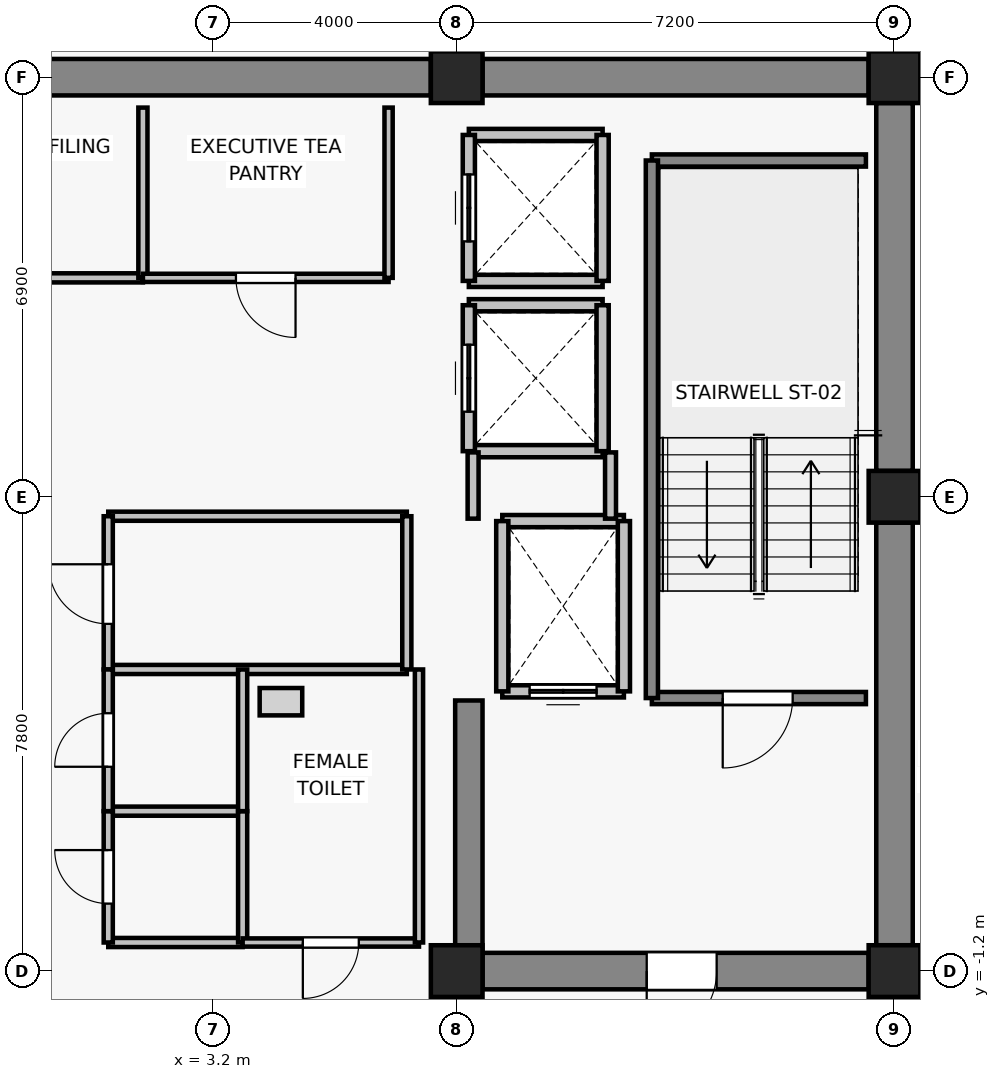
"""IFC4 building model, lengths in metres.
Left out: names, types, materials, properties, quantities, classifications, styles, units other than length and angle.
Written with IfcOpenShell. Run it as: python <this file> out.ifc"""

import sys

from ifc_helpers import new_model, si_unit, direction, frame, frame_2d, origin, origin_2d, place, context, subcontext, project, spatial, rectangle, extrude, source, transform, mapped, element, fill, save


model = new_model("IFC4")
c1 = context("Model", 3, precision=1e-05, world=origin(), true_north=direction((0.0, 1.0)))
c2 = subcontext(c1, "Body", "Model", "MODEL_VIEW")
j1 = project(units=[si_unit("LENGTHUNIT", "METRE"), si_unit("PLANEANGLEUNIT", "RADIAN")], contexts=[c1])
p1 = place(None, origin())
s1 = spatial("IfcSite", under=j1, at=p1, CompositionType="ELEMENT")
p2 = place(p1, origin())
s2 = spatial("IfcBuilding", under=s1, at=p2, CompositionType="ELEMENT")
p3 = place(p2, frame((0.0, 0.0, 225.4)))
s3 = spatial("IfcBuildingStorey", under=s2, at=p3, CompositionType="ELEMENT", Elevation=225.4)
for number, where, z_axis, x_axis in (
    (1, (7.2, -1.2, 0.0), (0.0, 0.0, 1.0), (1.0, 0.0, 0.0)),
    (2, (14.4, -1.2, 0.0), (0.0, 0.0, 1.0), (1.0, 0.0, 0.0)),
    (3, (14.4, 6.6, 0.0), (0.0, 0.0, 1.0), (1.0, 0.0, 0.0)),
    (4, (7.2, 13.5, 0.0), (0.0, 0.0, 1.0), (1.0, 0.0, 0.0)),
    (5, (14.4, 13.5, 0.0), (0.0, 0.0, 1.0), (1.0, 0.0, 0.0)),
):
    element("IfcColumn", number, at=place(p3, frame(where, z_axis=z_axis, x_axis=x_axis)), inside=s3, PredefinedType="COLUMN", context=c2, shape_type="SweptSolid", body=[
        extrude(rectangle(XDim=0.85, YDim=0.85, at=origin_2d()), origin(), (0.0, 0.0, 1.0), 3.3),
    ])
p4 = place(p3, frame((-6.775, 13.5, 0.0), z_axis=(0.0, 0.0, 1.0), x_axis=(1.0, 0.0, 0.0)))
e6 = element("IfcWall", 6, at=p4, inside=s3, PredefinedType="SHEAR", context=c2, shape_type="SweptSolid", body=[
    extrude(rectangle(XDim=13.55, YDim=0.6, at=frame_2d((6.775, 0.0))), origin(), (0.0, 0.0, 1.0), 3.075),
])
p5 = place(p3, frame((7.625, 13.5, 0.0), z_axis=(0.0, 0.0, 1.0), x_axis=(1.0, 0.0, 0.0)))
e7 = element("IfcWall", 7, at=p5, inside=s3, PredefinedType="SHEAR", context=c2, shape_type="SweptSolid", body=[
    extrude(rectangle(XDim=6.35, YDim=0.6, at=frame_2d((3.175, 0.0))), origin(), (0.0, 0.0, 1.0), 3.075),
])
p6 = place(p3, frame((14.4, -0.775, 0.0), z_axis=(0.0, 0.0, 1.0), x_axis=(0.0, 1.0, 0.0)))
e8 = element("IfcWall", 8, at=p6, inside=s3, PredefinedType="SHEAR", context=c2, shape_type="SweptSolid", body=[
    extrude(rectangle(XDim=6.95, YDim=0.6, at=frame_2d((3.475, 0.0))), origin(), (0.0, 0.0, 1.0), 3.075),
])
p7 = place(p3, frame((14.4, 7.025, 0.0), z_axis=(0.0, 0.0, 1.0), x_axis=(0.0, 1.0, 0.0)))
e9 = element("IfcWall", 9, at=p7, inside=s3, PredefinedType="SHEAR", context=c2, shape_type="SweptSolid", body=[
    extrude(rectangle(XDim=6.05, YDim=0.6, at=frame_2d((3.025, 0.0))), origin(), (0.0, 0.0, 1.0), 3.075),
])
p8 = place(p3, frame((13.975, -1.2, 0.0), z_axis=(0.0, 0.0, 1.0), x_axis=(-1.0, 0.0, 0.0)))
e10 = element("IfcWall", 10, at=p8, inside=s3, PredefinedType="SHEAR", context=c2, shape_type="SweptSolid", body=[
    extrude(rectangle(XDim=6.35, YDim=0.6, at=frame_2d((3.175, 0.0))), origin(), (0.0, 0.0, 1.0), 3.075),
])
p9 = place(p8, frame((2.5, 0.0, 0.0)))
e11 = element("IfcOpeningElement", 11, at=p9, cuts=e10, PredefinedType="OPENING", context=c2, shape_type="SweptSolid", body=[
    extrude(rectangle(XDim=1.15, YDim=2.15, at=frame_2d((0.575, 1.075))), frame((0.0, 0.31, 0.0), z_axis=(0.0, -1.0, 0.0), x_axis=(1.0, 0.0, 0.0)), (0.0, 0.0, 1.0), 0.62),
])
p10 = place(p3, frame((7.4, -0.9, 0.0), z_axis=(0.0, 0.0, 1.0), x_axis=(0.0, 1.0, 0.0)))
e12 = element("IfcWall", 12, at=p10, inside=s3, PredefinedType="SHEAR", context=c2, shape_type="SweptSolid", body=[
    extrude(rectangle(XDim=4.15, YDim=0.45, at=frame_2d((2.075, 0.0))), origin(), (0.0, 0.0, 1.0), 3.075),
])
p11 = place(p3, frame((9.95, 3.4, 0.0), z_axis=(0.0, 0.0, 1.0), x_axis=(-1.0, 0.0, 0.0)))
e13 = element("IfcWall", 13, at=p11, inside=s3, PredefinedType="SOLIDWALL", context=c2, shape_type="SweptSolid", body=[
    extrude(rectangle(XDim=2.0, YDim=0.2, at=frame_2d((1.0, 0.0))), origin(), (0.0, 0.0, 1.0), 3.075),
])
p12 = place(p11, frame((0.45, 0.0, 0.0)))
e14 = element("IfcOpeningElement", 14, at=p12, cuts=e13, PredefinedType="OPENING", context=c2, shape_type="SweptSolid", body=[
    extrude(rectangle(XDim=1.1, YDim=2.2, at=frame_2d((0.55, 1.1))), frame((0.0, 0.11, 0.0), z_axis=(0.0, -1.0, 0.0), x_axis=(1.0, 0.0, 0.0)), (0.0, 0.0, 1.0), 0.22),
])
p13 = place(p3, frame((7.95, 6.2, 0.0), z_axis=(0.0, 0.0, 1.0), x_axis=(1.0, 0.0, 0.0)))
e15 = element("IfcWall", 15, at=p13, inside=s3, PredefinedType="SOLIDWALL", context=c2, shape_type="SweptSolid", body=[
    extrude(rectangle(XDim=2.0, YDim=0.2, at=frame_2d((1.0, 0.0))), origin(), (0.0, 0.0, 1.0), 3.075),
])
for number, where, z_axis, x_axis in (
    (16, (7.95, 3.4, 0.0), (0.0, 0.0, 1.0), (0.0, 1.0, 0.0)),
    (17, (9.95, 6.2, 0.0), (0.0, 0.0, 1.0), (0.0, -1.0, 0.0)),
):
    element("IfcWall", number, at=place(p3, frame(where, z_axis=z_axis, x_axis=x_axis)), inside=s3, PredefinedType="SOLIDWALL", context=c2, shape_type="SweptSolid", body=[
        extrude(rectangle(XDim=2.8, YDim=0.2, at=frame_2d((1.4, 0.0))), origin(), (0.0, 0.0, 1.0), 3.075),
    ])
for number, where, z_axis, x_axis in (
    (18, (9.6, 7.35, 0.0), (0.0, 0.0, 1.0), (-1.0, 0.0, 0.0)),
    (19, (7.4, 9.75, 0.0), (0.0, 0.0, 1.0), (1.0, 0.0, 0.0)),
):
    element("IfcWall", number, at=place(p3, frame(where, z_axis=z_axis, x_axis=x_axis)), inside=s3, PredefinedType="SOLIDWALL", context=c2, shape_type="SweptSolid", body=[
        extrude(rectangle(XDim=2.2, YDim=0.2, at=frame_2d((1.1, 0.0))), origin(), (0.0, 0.0, 1.0), 2.615),
    ])
p14 = place(p3, frame((7.4, 7.35, 0.0), z_axis=(0.0, 0.0, 1.0), x_axis=(0.0, 1.0, 0.0)))
e20 = element("IfcWall", 20, at=p14, inside=s3, PredefinedType="SOLIDWALL", context=c2, shape_type="SweptSolid", body=[
    extrude(rectangle(XDim=2.4, YDim=0.2, at=frame_2d((1.2, 0.0))), origin(), (0.0, 0.0, 1.0), 2.615),
])
p15 = place(p14, frame((0.65, 0.0, 0.0)))
e21 = element("IfcOpeningElement", 21, at=p15, cuts=e20, PredefinedType="OPENING", context=c2, shape_type="SweptSolid", body=[
    extrude(rectangle(XDim=1.1, YDim=2.2, at=frame_2d((0.55, 1.1))), frame((0.0, 0.11, 0.0), z_axis=(0.0, -1.0, 0.0), x_axis=(1.0, 0.0, 0.0)), (0.0, 0.0, 1.0), 0.22),
])
p16 = place(p3, frame((9.6, 9.75, 0.0), z_axis=(0.0, 0.0, 1.0), x_axis=(0.0, -1.0, 0.0)))
e22 = element("IfcWall", 22, at=p16, inside=s3, PredefinedType="SOLIDWALL", context=c2, shape_type="SweptSolid", body=[
    extrude(rectangle(XDim=2.4, YDim=0.2, at=frame_2d((1.2, 0.0))), origin(), (0.0, 0.0, 1.0), 3.075),
])
for number, where, z_axis, x_axis in (
    (23, (9.6, 10.15, 0.0), (0.0, 0.0, 1.0), (-1.0, 0.0, 0.0)),
    (24, (7.4, 12.55, 0.0), (0.0, 0.0, 1.0), (1.0, 0.0, 0.0)),
):
    element("IfcWall", number, at=place(p3, frame(where, z_axis=z_axis, x_axis=x_axis)), inside=s3, PredefinedType="SOLIDWALL", context=c2, shape_type="SweptSolid", body=[
        extrude(rectangle(XDim=2.2, YDim=0.2, at=frame_2d((1.1, 0.0))), origin(), (0.0, 0.0, 1.0), 2.615),
    ])
p17 = place(p3, frame((7.4, 10.15, 0.0), z_axis=(0.0, 0.0, 1.0), x_axis=(0.0, 1.0, 0.0)))
e25 = element("IfcWall", 25, at=p17, inside=s3, PredefinedType="SOLIDWALL", context=c2, shape_type="SweptSolid", body=[
    extrude(rectangle(XDim=2.4, YDim=0.2, at=frame_2d((1.2, 0.0))), origin(), (0.0, 0.0, 1.0), 2.615),
])
p18 = place(p17, frame((0.65, 0.0, 0.0)))
e26 = element("IfcOpeningElement", 26, at=p18, cuts=e25, PredefinedType="OPENING", context=c2, shape_type="SweptSolid", body=[
    extrude(rectangle(XDim=1.1, YDim=2.2, at=frame_2d((0.55, 1.1))), frame((0.0, 0.11, 0.0), z_axis=(0.0, -1.0, 0.0), x_axis=(1.0, 0.0, 0.0)), (0.0, 0.0, 1.0), 0.22),
])
p19 = place(p3, frame((9.6, 12.55, 0.0), z_axis=(0.0, 0.0, 1.0), x_axis=(0.0, -1.0, 0.0)))
e27 = element("IfcWall", 27, at=p19, inside=s3, PredefinedType="SOLIDWALL", context=c2, shape_type="SweptSolid", body=[
    extrude(rectangle(XDim=2.4, YDim=0.2, at=frame_2d((1.2, 0.0))), origin(), (0.0, 0.0, 1.0), 3.075),
])
p20 = place(p3, frame((13.93, 3.29, 0.0), z_axis=(0.0, 0.0, 1.0), x_axis=(-1.0, 0.0, 0.0)))
e28 = element("IfcWall", 28, at=p20, inside=s3, PredefinedType="SOLIDWALL", context=c2, shape_type="SweptSolid", body=[
    extrude(rectangle(XDim=3.52, YDim=0.2, at=frame_2d((1.76, 0.0))), origin(), (0.0, 0.0, 1.0), 3.075),
])
p21 = place(p20, frame((1.205, 0.0, 0.0)))
e29 = element("IfcOpeningElement", 29, at=p21, cuts=e28, PredefinedType="OPENING", context=c2, shape_type="SweptSolid", body=[
    extrude(rectangle(XDim=1.15, YDim=2.15, at=frame_2d((0.575, 1.075))), frame((0.0, 0.11, 0.0), z_axis=(0.0, -1.0, 0.0), x_axis=(1.0, 0.0, 0.0)), (0.0, 0.0, 1.0), 0.22),
])
p22 = place(p3, frame((10.41, 12.13, 0.0), z_axis=(0.0, 0.0, 1.0), x_axis=(1.0, 0.0, 0.0)))
e30 = element("IfcWall", 30, at=p22, inside=s3, PredefinedType="SOLIDWALL", context=c2, shape_type="SweptSolid", body=[
    extrude(rectangle(XDim=3.52, YDim=0.2, at=frame_2d((1.76, 0.0))), origin(), (0.0, 0.0, 1.0), 3.075),
])
p23 = place(p3, frame((10.41, 3.29, 0.0), z_axis=(0.0, 0.0, 1.0), x_axis=(0.0, 1.0, 0.0)))
e31 = element("IfcWall", 31, at=p23, inside=s3, PredefinedType="SOLIDWALL", context=c2, shape_type="SweptSolid", body=[
    extrude(rectangle(XDim=8.84, YDim=0.2, at=frame_2d((4.42, 0.0))), origin(), (0.0, 0.0, 1.0), 3.075),
])
p24 = place(p3, frame((7.47, 6.24, 0.0), z_axis=(0.0, 0.0, 1.0), x_axis=(0.0, 1.0, 0.0)))
e32 = element("IfcWall", 32, at=p24, inside=s3, PredefinedType="PARTITIONING", context=c2, shape_type="SweptSolid", body=[
    extrude(rectangle(XDim=1.09, YDim=0.18, at=frame_2d((0.545, 0.0))), origin(), (0.0, 0.0, 1.0), 2.615),
])
p25 = place(p3, frame((9.73, 7.33, 0.0), z_axis=(0.0, 0.0, 1.0), x_axis=(0.0, -1.0, 0.0)))
e33 = element("IfcWall", 33, at=p25, inside=s3, PredefinedType="PARTITIONING", context=c2, shape_type="SweptSolid", body=[
    extrude(rectangle(XDim=1.09, YDim=0.18, at=frame_2d((0.545, 0.0))), origin(), (0.0, 0.0, 1.0), 3.075),
])
p26 = place(p3, frame((2.04, 10.2, 0.0), z_axis=(0.0, 0.0, 1.0), x_axis=(-1.0, 0.0, 0.0)))
e34 = element("IfcWall", 34, at=p26, inside=s3, PredefinedType="PARTITIONING", context=c2, shape_type="SweptSolid", body=[
    extrude(rectangle(XDim=4.16, YDim=0.15, at=frame_2d((2.08, 0.0))), origin(), (0.0, 0.0, 1.0), 3.075),
])
p27 = place(p26, frame((1.55, 0.0, 0.0)))
e35 = element("IfcOpeningElement", 35, at=p27, cuts=e34, PredefinedType="OPENING", context=c2, shape_type="SweptSolid", body=[
    extrude(rectangle(XDim=0.98, YDim=2.15, at=frame_2d((0.49, 1.075))), frame((0.0, 0.085, 0.0), z_axis=(0.0, -1.0, 0.0), x_axis=(1.0, 0.0, 0.0)), (0.0, 0.0, 1.0), 0.17),
])
p28 = place(p3, frame((2.04, 13.0, 0.0), z_axis=(0.0, 0.0, 1.0), x_axis=(0.0, -1.0, 0.0)))
e36 = element("IfcWall", 36, at=p28, inside=s3, PredefinedType="PARTITIONING", context=c2, shape_type="SweptSolid", body=[
    extrude(rectangle(XDim=2.8, YDim=0.15, at=frame_2d((1.4, 0.0))), origin(), (0.0, 0.0, 1.0), 3.075),
])
p29 = place(p3, frame((6.08, 10.2, 0.0), z_axis=(0.0, 0.0, 1.0), x_axis=(-1.0, 0.0, 0.0)))
e37 = element("IfcWall", 37, at=p29, inside=s3, PredefinedType="PARTITIONING", context=c2, shape_type="SweptSolid", body=[
    extrude(rectangle(XDim=4.04, YDim=0.135, at=frame_2d((2.02, 0.0))), origin(), (0.0, 0.0, 1.0), 3.075),
])
p30 = place(p29, frame((1.53, 0.0, 0.0)))
e38 = element("IfcOpeningElement", 38, at=p30, cuts=e37, PredefinedType="OPENING", context=c2, shape_type="SweptSolid", body=[
    extrude(rectangle(XDim=0.98, YDim=2.15, at=frame_2d((0.49, 1.075))), frame((0.0, 0.077, 0.0), z_axis=(0.0, -1.0, 0.0), x_axis=(1.0, 0.0, 0.0)), (0.0, 0.0, 1.0), 0.155),
])
p31 = place(p3, frame((6.08, 13.0, 0.0), z_axis=(0.0, 0.0, 1.0), x_axis=(0.0, -1.0, 0.0)))
e39 = element("IfcWall", 39, at=p31, inside=s3, PredefinedType="PARTITIONING", context=c2, shape_type="SweptSolid", body=[
    extrude(rectangle(XDim=2.8, YDim=0.135, at=frame_2d((1.4, 0.0))), origin(), (0.0, 0.0, 1.0), 3.075),
])
for number, where, z_axis, x_axis in (
    (40, (6.38, 3.76, 0.0), (0.0, 0.0, 1.0), (-1.0, 0.0, 0.0)),
    (41, (1.47, 6.28, 0.0), (0.0, 0.0, 1.0), (1.0, 0.0, 0.0)),
):
    element("IfcWall", number, at=place(p3, frame(where, z_axis=z_axis, x_axis=x_axis)), inside=s3, PredefinedType="PARTITIONING", context=c2, shape_type="SweptSolid", body=[
        extrude(rectangle(XDim=4.91, YDim=0.15, at=frame_2d((2.455, 0.0))), origin(), (0.0, 0.0, 1.0), 3.075),
    ])
p32 = place(p3, frame((1.47, 3.76, 0.0), z_axis=(0.0, 0.0, 1.0), x_axis=(0.0, 1.0, 0.0)))
e42 = element("IfcWall", 42, at=p32, inside=s3, PredefinedType="PARTITIONING", context=c2, shape_type="SweptSolid", body=[
    extrude(rectangle(XDim=2.52, YDim=0.15, at=frame_2d((1.26, 0.0))), origin(), (0.0, 0.0, 1.0), 3.075),
])
p33 = place(p32, frame((0.75, 0.0, 0.0)))
e43 = element("IfcOpeningElement", 43, at=p33, cuts=e42, PredefinedType="OPENING", context=c2, shape_type="SweptSolid", body=[
    extrude(rectangle(XDim=0.98, YDim=2.15, at=frame_2d((0.49, 1.075))), frame((0.0, 0.085, 0.0), z_axis=(0.0, -1.0, 0.0), x_axis=(1.0, 0.0, 0.0)), (0.0, 0.0, 1.0), 0.17),
])
p34 = place(p3, frame((6.38, 6.28, 0.0), z_axis=(0.0, 0.0, 1.0), x_axis=(0.0, -1.0, 0.0)))
e44 = element("IfcWall", 44, at=p34, inside=s3, PredefinedType="PARTITIONING", context=c2, shape_type="SweptSolid", body=[
    extrude(rectangle(XDim=2.52, YDim=0.15, at=frame_2d((1.26, 0.0))), origin(), (0.0, 0.0, 1.0), 3.075),
])
for number, where, z_axis, x_axis in (
    (45, (3.68, -0.73, 0.0), (0.0, 0.0, 1.0), (-1.0, 0.0, 0.0)),
    (46, (1.47, 1.43, 0.0), (0.0, 0.0, 1.0), (1.0, 0.0, 0.0)),
):
    element("IfcWall", number, at=place(p3, frame(where, z_axis=z_axis, x_axis=x_axis)), inside=s3, PredefinedType="PARTITIONING", context=c2, shape_type="SweptSolid", body=[
        extrude(rectangle(XDim=2.21, YDim=0.15, at=frame_2d((1.105, 0.0))), origin(), (0.0, 0.0, 1.0), 3.075),
    ])
p35 = place(p3, frame((1.47, -0.73, 0.0), z_axis=(0.0, 0.0, 1.0), x_axis=(0.0, 1.0, 0.0)))
e47 = element("IfcWall", 47, at=p35, inside=s3, PredefinedType="PARTITIONING", context=c2, shape_type="SweptSolid", body=[
    extrude(rectangle(XDim=2.16, YDim=0.15, at=frame_2d((1.08, 0.0))), origin(), (0.0, 0.0, 1.0), 3.075),
])
p36 = place(p35, frame((0.64, 0.0, 0.0)))
e48 = element("IfcOpeningElement", 48, at=p36, cuts=e47, PredefinedType="OPENING", context=c2, shape_type="SweptSolid", body=[
    extrude(rectangle(XDim=0.88, YDim=2.1, at=frame_2d((0.44, 1.05))), frame((0.0, 0.085, 0.0), z_axis=(0.0, -1.0, 0.0), x_axis=(1.0, 0.0, 0.0)), (0.0, 0.0, 1.0), 0.17),
])
p37 = place(p3, frame((3.68, 1.43, 0.0), z_axis=(0.0, 0.0, 1.0), x_axis=(0.0, -1.0, 0.0)))
e49 = element("IfcWall", 49, at=p37, inside=s3, PredefinedType="PARTITIONING", context=c2, shape_type="SweptSolid", body=[
    extrude(rectangle(XDim=2.16, YDim=0.15, at=frame_2d((1.08, 0.0))), origin(), (0.0, 0.0, 1.0), 3.075),
])
p38 = place(p3, frame((1.47, 1.43, 0.0), z_axis=(0.0, 0.0, 1.0), x_axis=(0.0, 1.0, 0.0)))
e50 = element("IfcWall", 50, at=p38, inside=s3, PredefinedType="PARTITIONING", context=c2, shape_type="SweptSolid", body=[
    extrude(rectangle(XDim=2.33, YDim=0.15, at=frame_2d((1.165, 0.0))), origin(), (0.0, 0.0, 1.0), 3.075),
])
p39 = place(p38, frame((0.73, 0.0, 0.0)))
e51 = element("IfcOpeningElement", 51, at=p39, cuts=e50, PredefinedType="OPENING", context=c2, shape_type="SweptSolid", body=[
    extrude(rectangle(XDim=0.88, YDim=2.15, at=frame_2d((0.44, 1.075))), frame((0.0, 0.085, 0.0), z_axis=(0.0, -1.0, 0.0), x_axis=(1.0, 0.0, 0.0)), (0.0, 0.0, 1.0), 0.17),
])
p40 = place(p3, frame((3.68, 3.76, 0.0), z_axis=(0.0, 0.0, 1.0), x_axis=(0.0, -1.0, 0.0)))
e52 = element("IfcWall", 52, at=p40, inside=s3, PredefinedType="PARTITIONING", context=c2, shape_type="SweptSolid", body=[
    extrude(rectangle(XDim=2.33, YDim=0.15, at=frame_2d((1.165, 0.0))), origin(), (0.0, 0.0, 1.0), 3.075),
])
p41 = place(p3, frame((6.58, -0.73, 0.0), z_axis=(0.0, 0.0, 1.0), x_axis=(-1.0, 0.0, 0.0)))
e53 = element("IfcWall", 53, at=p41, inside=s3, PredefinedType="PARTITIONING", context=c2, shape_type="SweptSolid", body=[
    extrude(rectangle(XDim=2.9, YDim=0.135, at=frame_2d((1.45, 0.0))), origin(), (0.0, 0.0, 1.0), 3.075),
])
p42 = place(p41, frame((0.99, 0.0, 0.0)))
e54 = element("IfcOpeningElement", 54, at=p42, cuts=e53, PredefinedType="OPENING", context=c2, shape_type="SweptSolid", body=[
    extrude(rectangle(XDim=0.92, YDim=2.1, at=frame_2d((0.46, 1.05))), frame((0.0, 0.077, 0.0), z_axis=(0.0, -1.0, 0.0), x_axis=(1.0, 0.0, 0.0)), (0.0, 0.0, 1.0), 0.155),
])
p43 = place(p3, frame((6.58, 3.76, 0.0), z_axis=(0.0, 0.0, 1.0), x_axis=(0.0, -1.0, 0.0)))
e55 = element("IfcWall", 55, at=p43, inside=s3, PredefinedType="PARTITIONING", context=c2, shape_type="SweptSolid", body=[
    extrude(rectangle(XDim=4.49, YDim=0.135, at=frame_2d((2.245, 0.0))), origin(), (0.0, 0.0, 1.0), 3.075),
])
m1 = source(origin(), c2, "Body", "SweptSolid", [
    extrude(rectangle(XDim=1.1, YDim=2.2, at=frame_2d((0.55, 1.1))), frame((0.0, 0.025, 0.0), z_axis=(0.0, -1.0, 0.0), x_axis=(1.0, 0.0, 0.0)), (0.0, 0.0, 1.0), 0.05),
])
p44 = place(p12, origin())
e56 = element("IfcDoor", 56, at=p44, inside=s3, OperationType="DOUBLE_DOOR_SLIDING", PredefinedType="DOOR", context=c2, shape_type="MappedRepresentation", body=[
    mapped(m1, transform((0.0, 0.0, 0.0), x_axis=(1.0, 0.0, 0.0), y_axis=(0.0, 1.0, 0.0), z_axis=(0.0, 0.0, 1.0), scale=1.0)),
])
fill(e14, e56)
p45 = place(p15, origin())
e57 = element("IfcDoor", 57, at=p45, inside=s3, OperationType="DOUBLE_DOOR_SLIDING", PredefinedType="DOOR", context=c2, shape_type="MappedRepresentation", body=[
    mapped(m1, transform((0.0, 0.0, 0.0), x_axis=(1.0, 0.0, 0.0), y_axis=(0.0, 1.0, 0.0), z_axis=(0.0, 0.0, 1.0), scale=1.0)),
])
fill(e21, e57)
p46 = place(p18, origin())
e58 = element("IfcDoor", 58, at=p46, inside=s3, OperationType="DOUBLE_DOOR_SLIDING", PredefinedType="DOOR", context=c2, shape_type="MappedRepresentation", body=[
    mapped(m1, transform((0.0, 0.0, 0.0), x_axis=(1.0, 0.0, 0.0), y_axis=(0.0, 1.0, 0.0), z_axis=(0.0, 0.0, 1.0), scale=1.0)),
])
fill(e26, e58)
m2 = source(origin(), c2, "Body", "SweptSolid", [
    extrude(rectangle(XDim=1.15, YDim=2.15, at=frame_2d((0.575, 1.075))), frame((0.0, 0.025, 0.0), z_axis=(0.0, -1.0, 0.0), x_axis=(1.0, 0.0, 0.0)), (0.0, 0.0, 1.0), 0.05),
])
p47 = place(p21, origin())
e59 = element("IfcDoor", 59, at=p47, inside=s3, OperationType="SINGLE_SWING_RIGHT", PredefinedType="DOOR", context=c2, shape_type="MappedRepresentation", body=[
    mapped(m2, transform((0.0, 0.0, 0.0), x_axis=(1.0, 0.0, 0.0), y_axis=(0.0, 1.0, 0.0), z_axis=(0.0, 0.0, 1.0), scale=1.0)),
])
fill(e29, e59)
p48 = place(p9, origin())
e60 = element("IfcDoor", 60, at=p48, inside=s3, OperationType="SINGLE_SWING_RIGHT", PredefinedType="DOOR", context=c2, shape_type="MappedRepresentation", body=[
    mapped(m2, transform((0.0, 0.0, 0.0), x_axis=(1.0, 0.0, 0.0), y_axis=(0.0, 1.0, 0.0), z_axis=(0.0, 0.0, 1.0), scale=1.0)),
])
fill(e11, e60)
m3 = source(origin(), c2, "Body", "SweptSolid", [
    extrude(rectangle(XDim=0.98, YDim=2.15, at=frame_2d((0.49, 1.075))), frame((0.0, 0.025, 0.0), z_axis=(0.0, -1.0, 0.0), x_axis=(1.0, 0.0, 0.0)), (0.0, 0.0, 1.0), 0.05),
])
p49 = place(p30, origin())
e61 = element("IfcDoor", 61, at=p49, inside=s3, OperationType="SINGLE_SWING_LEFT", PredefinedType="DOOR", context=c2, shape_type="MappedRepresentation", body=[
    mapped(m3, transform((0.0, 0.0, 0.0), x_axis=(1.0, 0.0, 0.0), y_axis=(0.0, 1.0, 0.0), z_axis=(0.0, 0.0, 1.0), scale=1.0)),
])
fill(e38, e61)
p50 = place(p33, origin())
e62 = element("IfcDoor", 62, at=p50, inside=s3, OperationType="SINGLE_SWING_RIGHT", PredefinedType="DOOR", context=c2, shape_type="MappedRepresentation", body=[
    mapped(m3, transform((0.0, 0.0, 0.0), x_axis=(1.0, 0.0, 0.0), y_axis=(0.0, 1.0, 0.0), z_axis=(0.0, 0.0, 1.0), scale=1.0)),
])
fill(e43, e62)
m4 = source(origin(), c2, "Body", "SweptSolid", [
    extrude(rectangle(XDim=0.88, YDim=2.1, at=frame_2d((0.44, 1.05))), frame((0.0, 0.025, 0.0), z_axis=(0.0, -1.0, 0.0), x_axis=(1.0, 0.0, 0.0)), (0.0, 0.0, 1.0), 0.05),
])
p51 = place(p36, origin())
e63 = element("IfcDoor", 63, at=p51, inside=s3, OperationType="SINGLE_SWING_RIGHT", PredefinedType="DOOR", context=c2, shape_type="MappedRepresentation", body=[
    mapped(m4, transform((0.0, 0.0, 0.0), x_axis=(1.0, 0.0, 0.0), y_axis=(0.0, 1.0, 0.0), z_axis=(0.0, 0.0, 1.0), scale=1.0)),
])
fill(e48, e63)
m5 = source(origin(), c2, "Body", "SweptSolid", [
    extrude(rectangle(XDim=0.88, YDim=2.15, at=frame_2d((0.44, 1.075))), frame((0.0, 0.025, 0.0), z_axis=(0.0, -1.0, 0.0), x_axis=(1.0, 0.0, 0.0)), (0.0, 0.0, 1.0), 0.05),
])
p52 = place(p39, origin())
e64 = element("IfcDoor", 64, at=p52, inside=s3, OperationType="SINGLE_SWING_LEFT", PredefinedType="DOOR", context=c2, shape_type="MappedRepresentation", body=[
    mapped(m5, transform((0.0, 0.0, 0.0), x_axis=(1.0, 0.0, 0.0), y_axis=(0.0, 1.0, 0.0), z_axis=(0.0, 0.0, 1.0), scale=1.0)),
])
fill(e51, e64)
m6 = source(origin(), c2, "Body", "SweptSolid", [
    extrude(rectangle(XDim=0.92, YDim=2.1, at=frame_2d((0.46, 1.05))), frame((0.0, 0.025, 0.0), z_axis=(0.0, -1.0, 0.0), x_axis=(1.0, 0.0, 0.0)), (0.0, 0.0, 1.0), 0.05),
])
p53 = place(p42, origin())
e65 = element("IfcDoor", 65, at=p53, inside=s3, OperationType="SINGLE_SWING_RIGHT", PredefinedType="DOOR", context=c2, shape_type="MappedRepresentation", body=[
    mapped(m6, transform((0.0, 0.0, 0.0), x_axis=(1.0, 0.0, 0.0), y_axis=(0.0, 1.0, 0.0), z_axis=(0.0, 0.0, 1.0), scale=1.0)),
])
fill(e54, e65)
save(model, sys.argv[1])
